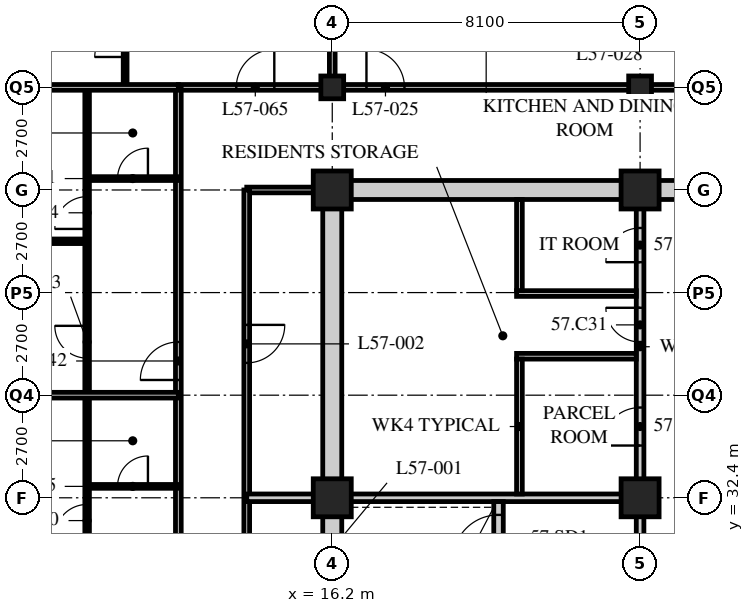
"""IFC4 building model, lengths in metres.
Left out: names, types, materials, properties, quantities, classifications, styles, units other than length and angle.
Written with IfcOpenShell. Run it as: python <this file> out.ifc"""

import sys

from ifc_helpers import new_model, si_unit, direction, frame, frame_2d, origin, origin_2d, place, context, subcontext, project, spatial, rectangle, hollow_rectangle, extrude, element, fill, save


model = new_model("IFC4")
c1 = context("Model", 3, precision=1e-05, world=origin(), true_north=direction((0.0, 1.0)))
c2 = subcontext(c1, "Body", "Model", "MODEL_VIEW")
j1 = project(units=[si_unit("LENGTHUNIT", "METRE"), si_unit("PLANEANGLEUNIT", "RADIAN")], contexts=[c1])
p1 = place(None, origin())
s1 = spatial("IfcSite", under=j1, at=p1, CompositionType="ELEMENT")
p2 = place(p1, origin())
s2 = spatial("IfcBuilding", under=s1, at=p2, CompositionType="ELEMENT")
p3 = place(p2, frame((0.0, 0.0, 220.8)))
s3 = spatial("IfcBuildingStorey", under=s2, at=p3, CompositionType="ELEMENT", Elevation=220.8)
for number, where, z_axis, x_axis in (
    (1, (16.2, 32.4, 0.0), (0.0, 0.0, 1.0), (1.0, 0.0, 0.0)),
    (2, (16.2, 40.5, 0.0), (0.0, 0.0, 1.0), (1.0, 0.0, 0.0)),
):
    element("IfcColumn", number, at=place(p3, frame(where, z_axis=z_axis, x_axis=x_axis)), inside=s3, PredefinedType="COLUMN", context=c2, shape_type="SweptSolid", body=[
        extrude(hollow_rectangle(XDim=1.0, YDim=1.0, WallThickness=0.1, at=origin_2d()), origin(), (0.0, 0.0, 1.0), 3.6),
    ])
p4 = place(p3, frame((16.2, 43.2, 0.0), z_axis=(0.0, 0.0, 1.0), x_axis=(1.0, 0.0, 0.0)))
e3 = element("IfcColumn", 3, at=p4, inside=s3, PredefinedType="COLUMN", context=c2, shape_type="SweptSolid", body=[
    extrude(hollow_rectangle(XDim=0.6, YDim=0.6, WallThickness=0.05, at=origin_2d()), origin(), (0.0, 0.0, 1.0), 3.6),
])
for number, where, z_axis, x_axis in (
    (4, (24.3, 32.4, 0.0), (0.0, 0.0, 1.0), (1.0, 0.0, 0.0)),
    (5, (24.3, 40.5, 0.0), (0.0, 0.0, 1.0), (1.0, 0.0, 0.0)),
):
    element("IfcColumn", number, at=place(p3, frame(where, z_axis=z_axis, x_axis=x_axis)), inside=s3, PredefinedType="COLUMN", context=c2, shape_type="SweptSolid", body=[
        extrude(hollow_rectangle(XDim=1.0, YDim=1.0, WallThickness=0.1, at=origin_2d()), origin(), (0.0, 0.0, 1.0), 3.6),
    ])
p5 = place(p3, frame((24.3, 43.2, 0.0), z_axis=(0.0, 0.0, 1.0), x_axis=(1.0, 0.0, 0.0)))
e6 = element("IfcColumn", 6, at=p5, inside=s3, PredefinedType="COLUMN", context=c2, shape_type="SweptSolid", body=[
    extrude(hollow_rectangle(XDim=0.6, YDim=0.6, WallThickness=0.05, at=origin_2d()), origin(), (0.0, 0.0, 1.0), 3.6),
])
p6 = place(p3, frame((12.15, 43.2, 0.0), z_axis=(0.0, 0.0, 1.0), x_axis=(1.0, 0.0, 0.0)))
e7 = element("IfcWall", 7, at=p6, inside=s3, PredefinedType="PARTITIONING", context=c2, shape_type="SweptSolid", body=[
    extrude(rectangle(XDim=36.45, YDim=0.15, at=frame_2d((18.225, 0.0))), origin(), (0.0, 0.0, 1.0), 2.628),
])
p7 = place(p6, frame((4.95, 0.0, 0.0)))
e8 = element("IfcOpeningElement", 8, at=p7, cuts=e7, PredefinedType="OPENING", context=c2, shape_type="SweptSolid", body=[
    extrude(rectangle(XDim=1.0, YDim=2.1, at=frame_2d((0.5, 1.05))), frame((0.0, 0.085, 0.0), z_axis=(0.0, -1.0, 0.0), x_axis=(1.0, 0.0, 0.0)), (0.0, 0.0, 1.0), 0.17),
])
p8 = place(p6, frame((25.0, 0.0, 0.0)))
e9 = element("IfcOpeningElement", 9, at=p8, cuts=e7, PredefinedType="OPENING", context=c2, shape_type="SweptSolid", body=[
    extrude(rectangle(XDim=1.0, YDim=2.1, at=frame_2d((0.5, 1.05))), frame((0.0, 0.085, 0.0), z_axis=(0.0, -1.0, 0.0), x_axis=(1.0, 0.0, 0.0)), (0.0, 0.0, 1.0), 0.17),
])
p9 = place(p6, frame((30.7, 0.0, 0.0)))
e10 = element("IfcOpeningElement", 10, at=p9, cuts=e7, PredefinedType="OPENING", context=c2, shape_type="SweptSolid", body=[
    extrude(rectangle(XDim=1.0, YDim=2.1, at=frame_2d((0.5, 1.05))), frame((0.0, 0.085, 0.0), z_axis=(0.0, -1.0, 0.0), x_axis=(1.0, 0.0, 0.0)), (0.0, 0.0, 1.0), 0.17),
])
p10 = place(p6, frame((33.925, 0.0, 0.0)))
e11 = element("IfcOpeningElement", 11, at=p10, cuts=e7, PredefinedType="OPENING", context=c2, shape_type="SweptSolid", body=[
    extrude(rectangle(XDim=1.0, YDim=2.1, at=frame_2d((0.5, 1.05))), frame((0.0, 0.085, 0.0), z_axis=(0.0, -1.0, 0.0), x_axis=(1.0, 0.0, 0.0)), (0.0, 0.0, 1.0), 0.17),
])
p11 = place(p6, frame((1.525, 0.0, 0.0)))
e12 = element("IfcOpeningElement", 12, at=p11, cuts=e7, PredefinedType="OPENING", context=c2, shape_type="SweptSolid", body=[
    extrude(rectangle(XDim=1.0, YDim=2.1, at=frame_2d((0.5, 1.05))), frame((0.0, 0.085, 0.0), z_axis=(0.0, -1.0, 0.0), x_axis=(1.0, 0.0, 0.0)), (0.0, 0.0, 1.0), 0.17),
])
p12 = place(p3, frame((12.15, 18.9, 0.0), z_axis=(0.0, 0.0, 1.0), x_axis=(0.0, 1.0, 0.0)))
e13 = element("IfcWall", 13, at=p12, inside=s3, PredefinedType="PARTITIONING", context=c2, shape_type="SweptSolid", body=[
    extrude(rectangle(XDim=24.3, YDim=0.15, at=frame_2d((12.15, 0.0))), origin(), (0.0, 0.0, 1.0), 3.39),
])
p13 = place(p12, frame((0.4, 0.0, 0.0)))
e14 = element("IfcOpeningElement", 14, at=p13, cuts=e13, PredefinedType="OPENING", context=c2, shape_type="SweptSolid", body=[
    extrude(rectangle(XDim=1.0, YDim=2.1, at=frame_2d((0.5, 1.05))), frame((0.0, 0.085, 0.0), z_axis=(0.0, -1.0, 0.0), x_axis=(1.0, 0.0, 0.0)), (0.0, 0.0, 1.0), 0.17),
])
p14 = place(p12, frame((16.6, 0.0, 0.0)))
e15 = element("IfcOpeningElement", 15, at=p14, cuts=e13, PredefinedType="OPENING", context=c2, shape_type="SweptSolid", body=[
    extrude(rectangle(XDim=1.0, YDim=2.1, at=frame_2d((0.5, 1.05))), frame((0.0, 0.085, 0.0), z_axis=(0.0, -1.0, 0.0), x_axis=(1.0, 0.0, 0.0)), (0.0, 0.0, 1.0), 0.17),
])
p15 = place(p3, frame((16.0, 40.5, 0.0), z_axis=(0.0, 0.0, 1.0), x_axis=(-1.0, 0.0, 0.0)))
e16 = element("IfcWall", 16, at=p15, inside=s3, PredefinedType="PARTITIONING", context=c2, shape_type="SweptSolid", body=[
    extrude(rectangle(XDim=2.05, YDim=0.15, at=frame_2d((1.025, 0.0))), origin(), (0.0, 0.0, 1.0), 3.39),
])
p16 = place(p3, frame((13.95, 40.5, 0.0), z_axis=(0.0, 0.0, 1.0), x_axis=(0.0, -1.0, 0.0)))
e17 = element("IfcWall", 17, at=p16, inside=s3, PredefinedType="PARTITIONING", context=c2, shape_type="SweptSolid", body=[
    extrude(rectangle(XDim=19.8, YDim=0.15, at=frame_2d((9.9, 0.0))), origin(), (0.0, 0.0, 1.0), 3.39),
])
p17 = place(p16, frame((11.65, 0.0, 0.0)))
e18 = element("IfcOpeningElement", 18, at=p17, cuts=e17, PredefinedType="OPENING", context=c2, shape_type="SweptSolid", body=[
    extrude(rectangle(XDim=1.0, YDim=2.1, at=frame_2d((0.5, 1.05))), frame((0.0, 0.085, 0.0), z_axis=(0.0, -1.0, 0.0), x_axis=(1.0, 0.0, 0.0)), (0.0, 0.0, 1.0), 0.17),
])
p18 = place(p16, frame((3.55, 0.0, 0.0)))
e19 = element("IfcOpeningElement", 19, at=p18, cuts=e17, PredefinedType="OPENING", context=c2, shape_type="SweptSolid", body=[
    extrude(rectangle(XDim=1.0, YDim=2.1, at=frame_2d((0.5, 1.05))), frame((0.0, 0.085, 0.0), z_axis=(0.0, -1.0, 0.0), x_axis=(1.0, 0.0, 0.0)), (0.0, 0.0, 1.0), 0.17),
])
p19 = place(p3, frame((13.95, 32.4, 0.0), z_axis=(0.0, 0.0, 1.0), x_axis=(1.0, 0.0, 0.0)))
e20 = element("IfcWall", 20, at=p19, inside=s3, PredefinedType="SOLIDWALL", context=c2, shape_type="SweptSolid", body=[
    extrude(rectangle(XDim=2.25, YDim=0.2, at=frame_2d((1.125, 0.0))), origin(), (0.0, 0.0, 1.0), 3.39),
])
p20 = place(p3, frame((9.75, 18.9, 0.0), z_axis=(0.0, 0.0, 1.0), x_axis=(0.0, 1.0, 0.0)))
e21 = element("IfcWall", 21, at=p20, inside=s3, PredefinedType="PARTITIONING", context=c2, shape_type="SweptSolid", body=[
    extrude(rectangle(XDim=24.3, YDim=0.12, at=frame_2d((12.15, 0.0))), origin(), (0.0, 0.0, 1.0), 3.39),
])
p21 = place(p20, frame((0.975, 0.0, 0.0)))
e22 = element("IfcOpeningElement", 22, at=p21, cuts=e21, PredefinedType="OPENING", context=c2, shape_type="SweptSolid", body=[
    extrude(rectangle(XDim=0.85, YDim=2.1, at=frame_2d((0.425, 1.05))), frame((0.0, 0.07, 0.0), z_axis=(0.0, -1.0, 0.0), x_axis=(1.0, 0.0, 0.0)), (0.0, 0.0, 1.0), 0.14),
])
p22 = place(p20, frame((8.425, 0.0, 0.0)))
e23 = element("IfcOpeningElement", 23, at=p22, cuts=e21, PredefinedType="OPENING", context=c2, shape_type="SweptSolid", body=[
    extrude(rectangle(XDim=0.85, YDim=2.1, at=frame_2d((0.425, 1.05))), frame((0.0, 0.07, 0.0), z_axis=(0.0, -1.0, 0.0), x_axis=(1.0, 0.0, 0.0)), (0.0, 0.0, 1.0), 0.14),
])
p23 = place(p20, frame((12.475, 0.0, 0.0)))
e24 = element("IfcOpeningElement", 24, at=p23, cuts=e21, PredefinedType="OPENING", context=c2, shape_type="SweptSolid", body=[
    extrude(rectangle(XDim=0.85, YDim=2.1, at=frame_2d((0.425, 1.05))), frame((0.0, 0.07, 0.0), z_axis=(0.0, -1.0, 0.0), x_axis=(1.0, 0.0, 0.0)), (0.0, 0.0, 1.0), 0.14),
])
p24 = place(p20, frame((17.175, 0.0, 0.0)))
e25 = element("IfcOpeningElement", 25, at=p24, cuts=e21, PredefinedType="OPENING", context=c2, shape_type="SweptSolid", body=[
    extrude(rectangle(XDim=0.85, YDim=2.1, at=frame_2d((0.425, 1.05))), frame((0.0, 0.07, 0.0), z_axis=(0.0, -1.0, 0.0), x_axis=(1.0, 0.0, 0.0)), (0.0, 0.0, 1.0), 0.14),
])
p25 = place(p20, frame((20.575, 0.0, 0.0)))
e26 = element("IfcOpeningElement", 26, at=p25, cuts=e21, PredefinedType="OPENING", context=c2, shape_type="SweptSolid", body=[
    extrude(rectangle(XDim=0.85, YDim=2.1, at=frame_2d((0.425, 1.05))), frame((0.0, 0.07, 0.0), z_axis=(0.0, -1.0, 0.0), x_axis=(1.0, 0.0, 0.0)), (0.0, 0.0, 1.0), 0.14),
])
p26 = place(p3, frame((12.15, 32.7, 0.0), z_axis=(0.0, 0.0, 1.0), x_axis=(-1.0, 0.0, 0.0)))
e27 = element("IfcWall", 27, at=p26, inside=s3, PredefinedType="PARTITIONING", context=c2, shape_type="SweptSolid", body=[
    extrude(rectangle(XDim=2.4, YDim=0.1, at=frame_2d((1.2, 0.0))), origin(), (0.0, 0.0, 1.0), 3.39),
])
p27 = place(p26, frame((0.8, 0.0, 0.0)))
e28 = element("IfcOpeningElement", 28, at=p27, cuts=e27, PredefinedType="OPENING", context=c2, shape_type="SweptSolid", body=[
    extrude(rectangle(XDim=0.8, YDim=2.1, at=frame_2d((0.4, 1.05))), frame((0.0, 0.06, 0.0), z_axis=(0.0, -1.0, 0.0), x_axis=(1.0, 0.0, 0.0)), (0.0, 0.0, 1.0), 0.12),
])
p28 = place(p3, frame((12.15, 35.1, 0.0), z_axis=(0.0, 0.0, 1.0), x_axis=(-1.0, 0.0, 0.0)))
e29 = element("IfcWall", 29, at=p28, inside=s3, PredefinedType="PARTITIONING", context=c2, shape_type="SweptSolid", body=[
    extrude(rectangle(XDim=11.85, YDim=0.15, at=frame_2d((5.925, 0.0))), origin(), (0.0, 0.0, 1.0), 2.628),
])
p29 = place(p3, frame((12.15, 40.8, 0.0), z_axis=(0.0, 0.0, 1.0), x_axis=(-1.0, 0.0, 0.0)))
e30 = element("IfcWall", 30, at=p29, inside=s3, PredefinedType="PARTITIONING", context=c2, shape_type="SweptSolid", body=[
    extrude(rectangle(XDim=2.4, YDim=0.1, at=frame_2d((1.2, 0.0))), origin(), (0.0, 0.0, 1.0), 3.39),
])
p30 = place(p29, frame((0.8, 0.0, 0.0)))
e31 = element("IfcOpeningElement", 31, at=p30, cuts=e30, PredefinedType="OPENING", context=c2, shape_type="SweptSolid", body=[
    extrude(rectangle(XDim=0.8, YDim=2.1, at=frame_2d((0.4, 1.05))), frame((0.0, 0.06, 0.0), z_axis=(0.0, -1.0, 0.0), x_axis=(1.0, 0.0, 0.0)), (0.0, 0.0, 1.0), 0.12),
])
p31 = place(p3, frame((9.75, 39.15, 0.0), z_axis=(0.0, 0.0, 1.0), x_axis=(-1.0, 0.0, 0.0)))
e32 = element("IfcWall", 32, at=p31, inside=s3, PredefinedType="PARTITIONING", context=c2, shape_type="SweptSolid", body=[
    extrude(rectangle(XDim=9.45, YDim=0.12, at=frame_2d((4.725, 0.0))), origin(), (0.0, 0.0, 1.0), 3.39),
])
p32 = place(p3, frame((10.75, 43.2, 0.0), z_axis=(0.0, 0.0, 1.0), x_axis=(0.0, 1.0, 0.0)))
e33 = element("IfcWall", 33, at=p32, inside=s3, PredefinedType="PARTITIONING", context=c2, shape_type="SweptSolid", body=[
    extrude(rectangle(XDim=2.4, YDim=0.1, at=frame_2d((1.2, 0.0))), origin(), (0.0, 0.0, 1.0), 3.39),
])
p33 = place(p32, frame((0.8, 0.0, 0.0)))
e34 = element("IfcOpeningElement", 34, at=p33, cuts=e33, PredefinedType="OPENING", context=c2, shape_type="SweptSolid", body=[
    extrude(rectangle(XDim=0.8, YDim=2.1, at=frame_2d((0.4, 1.05))), frame((0.0, 0.06, 0.0), z_axis=(0.0, -1.0, 0.0), x_axis=(1.0, 0.0, 0.0)), (0.0, 0.0, 1.0), 0.12),
])
p34 = place(p3, frame((0.3, 43.2, 0.0), z_axis=(0.0, 0.0, 1.0), x_axis=(1.0, 0.0, 0.0)))
e35 = element("IfcWall", 35, at=p34, inside=s3, PredefinedType="PARTITIONING", context=c2, shape_type="SweptSolid", body=[
    extrude(rectangle(XDim=11.85, YDim=0.15, at=frame_2d((5.925, 0.0))), origin(), (0.0, 0.0, 1.0), 2.628),
])
p35 = place(p3, frame((16.2, 43.2, 0.0), z_axis=(0.0, 0.0, 1.0), x_axis=(0.0, 1.0, 0.0)))
e36 = element("IfcWall", 36, at=p35, inside=s3, PredefinedType="PARTITIONING", context=c2, shape_type="SweptSolid", body=[
    extrude(rectangle(XDim=15.9, YDim=0.15, at=frame_2d((7.95, 0.0))), origin(), (0.0, 0.0, 1.0), 2.628),
])
p36 = place(p3, frame((15.95, 40.5, 0.0), z_axis=(0.0, 0.0, 1.0), x_axis=(1.0, 0.0, 0.0)))
e37 = element("IfcWall", 37, at=p36, inside=s3, PredefinedType="SOLIDWALL", context=c2, shape_type="SweptSolid", body=[
    extrude(rectangle(XDim=24.8, YDim=0.5, at=frame_2d((12.4, 0.0))), origin(), (0.0, 0.0, 1.0), 2.628),
])
p37 = place(p36, frame((11.5, 0.0, 0.0)))
e38 = element("IfcOpeningElement", 38, at=p37, cuts=e37, PredefinedType="OPENING", context=c2, shape_type="SweptSolid", body=[
    extrude(rectangle(XDim=1.8, YDim=2.4, at=frame_2d((0.9, 1.2))), frame((0.0, 0.26, 0.0), z_axis=(0.0, -1.0, 0.0), x_axis=(1.0, 0.0, 0.0)), (0.0, 0.0, 1.0), 0.52),
])
p38 = place(p3, frame((16.2, 24.55, 0.0), z_axis=(0.0, 0.0, 1.0), x_axis=(0.0, 1.0, 0.0)))
e39 = element("IfcWall", 39, at=p38, inside=s3, PredefinedType="SOLIDWALL", context=c2, shape_type="SweptSolid", body=[
    extrude(rectangle(XDim=15.7, YDim=0.5, at=frame_2d((7.85, 0.0))), origin(), (0.0, 0.0, 1.0), 2.628),
])
p39 = place(p3, frame((16.45, 32.4, 0.0), z_axis=(0.0, 0.0, 1.0), x_axis=(1.0, 0.0, 0.0)))
e40 = element("IfcWall", 40, at=p39, inside=s3, PredefinedType="SOLIDWALL", context=c2, shape_type="SweptSolid", body=[
    extrude(rectangle(XDim=7.95, YDim=0.2, at=frame_2d((3.975, 0.0))), origin(), (0.0, 0.0, 1.0), 2.778),
])
p40 = place(p3, frame((24.3, 24.55, 0.0), z_axis=(0.0, 0.0, 1.0), x_axis=(0.0, 1.0, 0.0)))
e41 = element("IfcWall", 41, at=p40, inside=s3, PredefinedType="SOLIDWALL", context=c2, shape_type="SweptSolid", body=[
    extrude(rectangle(XDim=7.75, YDim=0.2, at=frame_2d((3.875, 0.0))), origin(), (0.0, 0.0, 1.0), 2.778),
])
p41 = place(p40, frame((4.6, 0.0, 0.0)))
e42 = element("IfcOpeningElement", 42, at=p41, cuts=e41, PredefinedType="OPENING", context=c2, shape_type="SweptSolid", body=[
    extrude(rectangle(XDim=1.2, YDim=2.1, at=frame_2d((0.6, 1.05))), frame((0.0, 0.11, 0.0), z_axis=(0.0, -1.0, 0.0), x_axis=(1.0, 0.0, 0.0)), (0.0, 0.0, 1.0), 0.22),
])
p42 = place(p3, frame((20.575, 24.55, 0.0), z_axis=(0.0, 0.0, 1.0), x_axis=(0.0, 1.0, 0.0)))
e43 = element("IfcWall", 43, at=p42, inside=s3, PredefinedType="SOLIDWALL", context=c2, shape_type="SweptSolid", body=[
    extrude(rectangle(XDim=7.75, YDim=0.25, at=frame_2d((3.875, 0.0))), origin(), (0.0, 0.0, 1.0), 3.39),
])
p43 = place(p42, frame((6.2, 0.0, 0.0)))
e44 = element("IfcOpeningElement", 44, at=p43, cuts=e43, PredefinedType="OPENING", context=c2, shape_type="SweptSolid", body=[
    extrude(rectangle(XDim=1.2, YDim=2.1, at=frame_2d((0.6, 1.05))), frame((0.0, 0.135, 0.0), z_axis=(0.0, -1.0, 0.0), x_axis=(1.0, 0.0, 0.0)), (0.0, 0.0, 1.0), 0.27),
])
p44 = place(p3, frame((24.3, 32.5, 0.0), z_axis=(0.0, 0.0, 1.0), x_axis=(0.0, 1.0, 0.0)))
e45 = element("IfcWall", 45, at=p44, inside=s3, PredefinedType="PARTITIONING", context=c2, shape_type="SweptSolid", body=[
    extrude(rectangle(XDim=7.75, YDim=0.2, at=frame_2d((3.875, 0.0))), origin(), (0.0, 0.0, 1.0), 2.778),
])
p45 = place(p44, frame((1.275, 0.0, 0.0)))
e46 = element("IfcOpeningElement", 46, at=p45, cuts=e45, PredefinedType="OPENING", context=c2, shape_type="SweptSolid", body=[
    extrude(rectangle(XDim=1.0, YDim=2.1, at=frame_2d((0.5, 1.05))), frame((0.0, 0.11, 0.0), z_axis=(0.0, -1.0, 0.0), x_axis=(1.0, 0.0, 0.0)), (0.0, 0.0, 1.0), 0.22),
])
p46 = place(p44, frame((4.0, 0.0, 0.0)))
e47 = element("IfcOpeningElement", 47, at=p46, cuts=e45, PredefinedType="OPENING", context=c2, shape_type="SweptSolid", body=[
    extrude(rectangle(XDim=0.9, YDim=2.1, at=frame_2d((0.45, 1.05))), frame((0.0, 0.11, 0.0), z_axis=(0.0, -1.0, 0.0), x_axis=(1.0, 0.0, 0.0)), (0.0, 0.0, 1.0), 0.22),
])
p47 = place(p44, frame((6.1, 0.0, 0.0)))
e48 = element("IfcOpeningElement", 48, at=p47, cuts=e45, PredefinedType="OPENING", context=c2, shape_type="SweptSolid", body=[
    extrude(rectangle(XDim=0.9, YDim=2.1, at=frame_2d((0.45, 1.05))), frame((0.0, 0.11, 0.0), z_axis=(0.0, -1.0, 0.0), x_axis=(1.0, 0.0, 0.0)), (0.0, 0.0, 1.0), 0.22),
])
for number, where, z_axis, x_axis in (
    (49, (21.05, 36.125, 0.0), (0.0, 0.0, 1.0), (1.0, 0.0, 0.0)),
    (50, (21.05, 37.775, 0.0), (0.0, 0.0, 1.0), (1.0, 0.0, 0.0)),
):
    element("IfcWall", number, at=place(p3, frame(where, z_axis=z_axis, x_axis=x_axis)), inside=s3, PredefinedType="PARTITIONING", context=c2, shape_type="SweptSolid", body=[
        extrude(rectangle(XDim=3.15, YDim=0.15, at=frame_2d((1.575, 0.0))), origin(), (0.0, 0.0, 1.0), 3.39),
    ])
p48 = place(p3, frame((21.125, 32.5, 0.0), z_axis=(0.0, 0.0, 1.0), x_axis=(0.0, 1.0, 0.0)))
e51 = element("IfcWall", 51, at=p48, inside=s3, PredefinedType="PARTITIONING", context=c2, shape_type="SweptSolid", body=[
    extrude(rectangle(XDim=3.55, YDim=0.15, at=frame_2d((1.775, 0.0))), origin(), (0.0, 0.0, 1.0), 3.39),
])
p49 = place(p3, frame((21.125, 37.85, 0.0), z_axis=(0.0, 0.0, 1.0), x_axis=(0.0, 1.0, 0.0)))
e52 = element("IfcWall", 52, at=p49, inside=s3, PredefinedType="PARTITIONING", context=c2, shape_type="SweptSolid", body=[
    extrude(rectangle(XDim=2.4, YDim=0.15, at=frame_2d((1.2, 0.0))), origin(), (0.0, 0.0, 1.0), 3.39),
])
p50 = place(p18, origin())
e53 = element("IfcDoor", 53, at=p50, inside=s3, OperationType="SINGLE_SWING_LEFT", PredefinedType="DOOR", context=c2, shape_type="SweptSolid", body=[
    extrude(rectangle(XDim=1.0, YDim=2.1, at=frame_2d((0.5, 1.05))), frame((0.0, 0.025, 0.0), z_axis=(0.0, -1.0, 0.0), x_axis=(1.0, 0.0, 0.0)), (0.0, 0.0, 1.0), 0.05),
])
fill(e19, e53)
p51 = place(p7, origin())
e54 = element("IfcDoor", 54, at=p51, inside=s3, OperationType="SINGLE_SWING_LEFT", PredefinedType="DOOR", context=c2, shape_type="SweptSolid", body=[
    extrude(rectangle(XDim=1.0, YDim=2.1, at=frame_2d((0.5, 1.05))), frame((0.0, 0.025, 0.0), z_axis=(0.0, -1.0, 0.0), x_axis=(1.0, 0.0, 0.0)), (0.0, 0.0, 1.0), 0.05),
])
fill(e8, e54)
p52 = place(p27, origin())
e55 = element("IfcDoor", 55, at=p52, inside=s3, OperationType="SINGLE_SWING_RIGHT", PredefinedType="DOOR", context=c2, shape_type="SweptSolid", body=[
    extrude(rectangle(XDim=0.8, YDim=2.1, at=frame_2d((0.4, 1.05))), frame((0.0, 0.025, 0.0), z_axis=(0.0, -1.0, 0.0), x_axis=(1.0, 0.0, 0.0)), (0.0, 0.0, 1.0), 0.05),
])
fill(e28, e55)
p53 = place(p23, origin())
e56 = element("IfcDoor", 56, at=p53, inside=s3, OperationType="SINGLE_SWING_LEFT", PredefinedType="DOOR", context=c2, shape_type="SweptSolid", body=[
    extrude(rectangle(XDim=0.85, YDim=2.1, at=frame_2d((0.425, 1.05))), frame((0.0, 0.025, 0.0), z_axis=(0.0, -1.0, 0.0), x_axis=(1.0, 0.0, 0.0)), (0.0, 0.0, 1.0), 0.05),
])
fill(e24, e56)
p54 = place(p30, origin())
e57 = element("IfcDoor", 57, at=p54, inside=s3, OperationType="SINGLE_SWING_RIGHT", PredefinedType="DOOR", context=c2, shape_type="SweptSolid", body=[
    extrude(rectangle(XDim=0.8, YDim=2.1, at=frame_2d((0.4, 1.05))), frame((0.0, 0.025, 0.0), z_axis=(0.0, -1.0, 0.0), x_axis=(1.0, 0.0, 0.0)), (0.0, 0.0, 1.0), 0.05),
])
fill(e31, e57)
p55 = place(p14, origin())
e58 = element("IfcDoor", 58, at=p55, inside=s3, OperationType="SINGLE_SWING_LEFT", PredefinedType="DOOR", context=c2, shape_type="SweptSolid", body=[
    extrude(rectangle(XDim=1.0, YDim=2.1, at=frame_2d((0.5, 1.05))), frame((0.0, 0.025, 0.0), z_axis=(0.0, -1.0, 0.0), x_axis=(1.0, 0.0, 0.0)), (0.0, 0.0, 1.0), 0.05),
])
fill(e15, e58)
p56 = place(p24, origin())
e59 = element("IfcDoor", 59, at=p56, inside=s3, OperationType="SINGLE_SWING_RIGHT", PredefinedType="DOOR", context=c2, shape_type="SweptSolid", body=[
    extrude(rectangle(XDim=0.85, YDim=2.1, at=frame_2d((0.425, 1.05))), frame((0.0, 0.025, 0.0), z_axis=(0.0, -1.0, 0.0), x_axis=(1.0, 0.0, 0.0)), (0.0, 0.0, 1.0), 0.05),
])
fill(e25, e59)
p57 = place(p25, origin())
e60 = element("IfcDoor", 60, at=p57, inside=s3, OperationType="SINGLE_SWING_LEFT", PredefinedType="DOOR", context=c2, shape_type="SweptSolid", body=[
    extrude(rectangle(XDim=0.85, YDim=2.1, at=frame_2d((0.425, 1.05))), frame((0.0, 0.025, 0.0), z_axis=(0.0, -1.0, 0.0), x_axis=(1.0, 0.0, 0.0)), (0.0, 0.0, 1.0), 0.05),
])
fill(e26, e60)
p58 = place(p11, origin())
e61 = element("IfcDoor", 61, at=p58, inside=s3, OperationType="SINGLE_SWING_RIGHT", PredefinedType="DOOR", context=c2, shape_type="SweptSolid", body=[
    extrude(rectangle(XDim=1.0, YDim=2.1, at=frame_2d((0.5, 1.05))), frame((0.0, 0.025, 0.0), z_axis=(0.0, -1.0, 0.0), x_axis=(1.0, 0.0, 0.0)), (0.0, 0.0, 1.0), 0.05),
])
fill(e12, e61)
p59 = place(p33, origin())
e62 = element("IfcDoor", 62, at=p59, inside=s3, OperationType="SINGLE_SWING_LEFT", PredefinedType="DOOR", context=c2, shape_type="SweptSolid", body=[
    extrude(rectangle(XDim=0.8, YDim=2.1, at=frame_2d((0.4, 1.05))), frame((0.0, 0.025, 0.0), z_axis=(0.0, -1.0, 0.0), x_axis=(1.0, 0.0, 0.0)), (0.0, 0.0, 1.0), 0.05),
])
fill(e34, e62)
p60 = place(p45, origin())
e63 = element("IfcDoor", 63, at=p60, inside=s3, OperationType="SINGLE_SWING_LEFT", PredefinedType="DOOR", context=c2, shape_type="SweptSolid", body=[
    extrude(rectangle(XDim=1.0, YDim=2.1, at=frame_2d((0.5, 1.05))), frame((0.0, 0.025, 0.0), z_axis=(0.0, -1.0, 0.0), x_axis=(1.0, 0.0, 0.0)), (0.0, 0.0, 1.0), 0.05),
])
fill(e46, e63)
p61 = place(p46, origin())
e64 = element("IfcDoor", 64, at=p61, inside=s3, OperationType="SINGLE_SWING_RIGHT", PredefinedType="DOOR", context=c2, shape_type="SweptSolid", body=[
    extrude(rectangle(XDim=0.9, YDim=2.1, at=frame_2d((0.45, 1.05))), frame((0.0, 0.025, 0.0), z_axis=(0.0, -1.0, 0.0), x_axis=(1.0, 0.0, 0.0)), (0.0, 0.0, 1.0), 0.05),
])
fill(e47, e64)
p62 = place(p47, origin())
e65 = element("IfcDoor", 65, at=p62, inside=s3, OperationType="SINGLE_SWING_LEFT", PredefinedType="DOOR", context=c2, shape_type="SweptSolid", body=[
    extrude(rectangle(XDim=0.9, YDim=2.1, at=frame_2d((0.45, 1.05))), frame((0.0, 0.025, 0.0), z_axis=(0.0, -1.0, 0.0), x_axis=(1.0, 0.0, 0.0)), (0.0, 0.0, 1.0), 0.05),
])
fill(e48, e65)
p63 = place(p43, origin())
e66 = element("IfcDoor", 66, at=p63, inside=s3, OperationType="SINGLE_SWING_LEFT", PredefinedType="DOOR", context=c2, shape_type="SweptSolid", body=[
    extrude(rectangle(XDim=1.2, YDim=2.1, at=frame_2d((0.6, 1.05))), frame((0.0, 0.025, 0.0), z_axis=(0.0, -1.0, 0.0), x_axis=(1.0, 0.0, 0.0)), (0.0, 0.0, 1.0), 0.05),
])
fill(e44, e66)
save(model, sys.argv[1])
